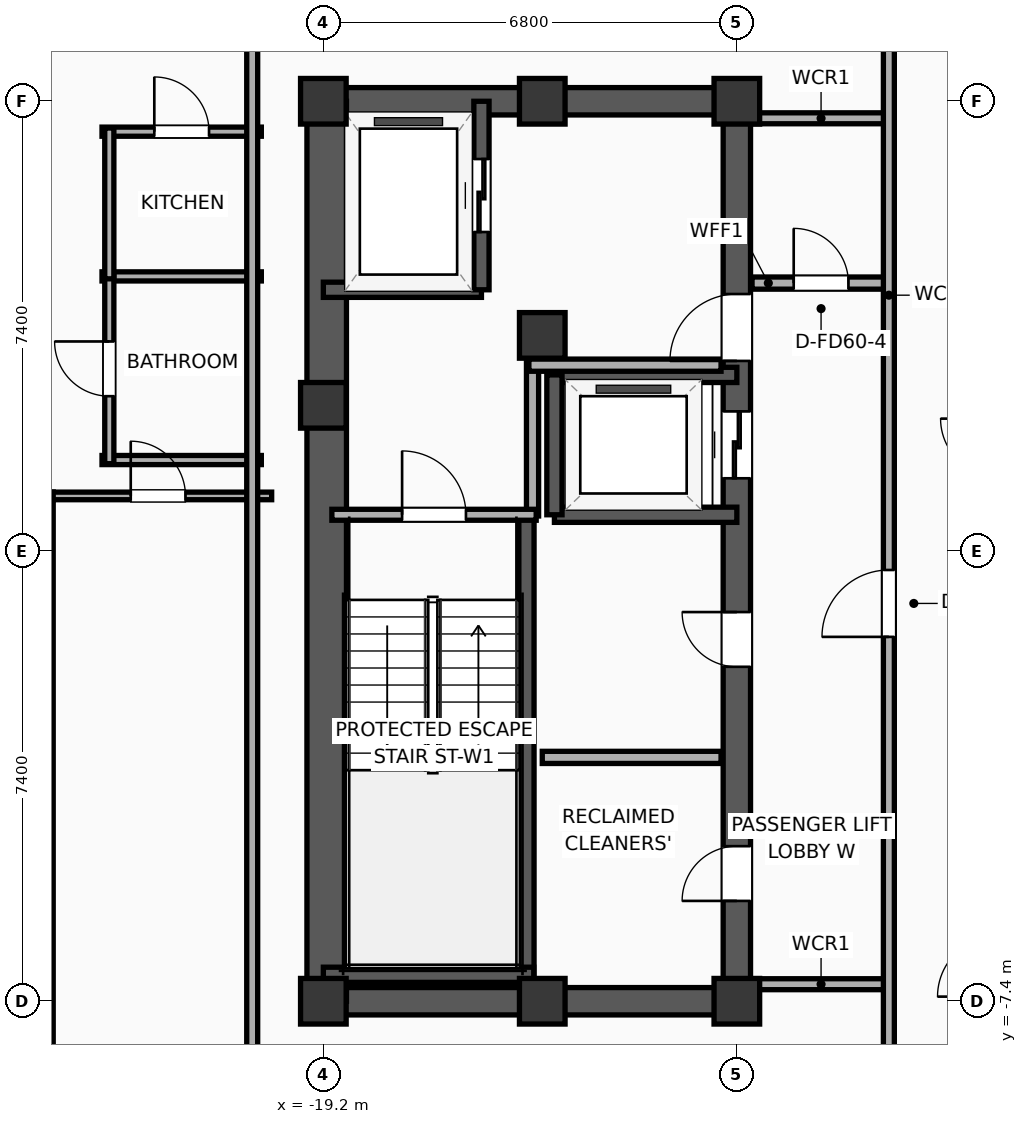
"""IFC4 building model, lengths in metres.
Left out: names, types, materials, properties, quantities, classifications, styles, units other than length and angle.
Written with IfcOpenShell. Run it as: python <this file> out.ifc"""

import sys

from ifc_helpers import new_model, si_unit, direction, frame, frame_2d, origin, origin_2d, place, context, subcontext, project, spatial, rectangle, extrude, element, fill, save


model = new_model("IFC4")
c1 = context("Model", 3, precision=1e-05, world=origin(), true_north=direction((0.0, 1.0)))
c2 = subcontext(c1, "Body", "Model", "MODEL_VIEW")
j1 = project(units=[si_unit("LENGTHUNIT", "METRE"), si_unit("PLANEANGLEUNIT", "RADIAN")], contexts=[c1])
p1 = place(None, origin())
s1 = spatial("IfcSite", under=j1, at=p1, CompositionType="ELEMENT")
p2 = place(p1, origin())
s2 = spatial("IfcBuilding", under=s1, at=p2, CompositionType="ELEMENT")
p3 = place(p2, frame((0.0, 0.0, 271.7)))
s3 = spatial("IfcBuildingStorey", under=s2, at=p3, CompositionType="ELEMENT", Elevation=271.7)
for number, where, z_axis, x_axis in (
    (1, (-19.2, -7.4, 0.0), (0.0, 0.0, 1.0), (1.0, 0.0, 0.0)),
    (2, (-19.2, 2.4, 0.0), (0.0, 0.0, 1.0), (1.0, 0.0, 0.0)),
    (3, (-19.2, 7.4, 0.0), (0.0, 0.0, 1.0), (1.0, 0.0, 0.0)),
    (4, (-15.6, -7.4, 0.0), (0.0, 0.0, 1.0), (1.0, 0.0, 0.0)),
    (5, (-15.6, 7.4, 0.0), (0.0, 0.0, 1.0), (1.0, 0.0, 0.0)),
    (6, (-12.4, -7.4, 0.0), (0.0, 0.0, 1.0), (1.0, 0.0, 0.0)),
    (7, (-15.6, 3.55, 0.0), (0.0, 0.0, 1.0), (1.0, 0.0, 0.0)),
    (8, (-12.4, 7.4, 0.0), (0.0, 0.0, 1.0), (1.0, 0.0, 0.0)),
):
    element("IfcColumn", number, at=place(p3, frame(where, z_axis=z_axis, x_axis=x_axis)), inside=s3, PredefinedType="COLUMN", context=c2, shape_type="SweptSolid", body=[
        extrude(rectangle(XDim=0.75, YDim=0.75, at=origin_2d()), origin(), (0.0, 0.0, 1.0), 3.9),
    ])
for number, where, z_axis, x_axis in (
    (9, (-19.425, -7.4, 0.0), (0.0, 0.0, 1.0), (1.0, 0.0, 0.0)),
    (10, (-19.425, 7.4, 0.0), (0.0, 0.0, 1.0), (1.0, 0.0, 0.0)),
):
    element("IfcWall", number, at=place(p3, frame(where, z_axis=z_axis, x_axis=x_axis)), inside=s3, PredefinedType="SHEAR", context=c2, shape_type="SweptSolid", body=[
        extrude(rectangle(XDim=7.25, YDim=0.45, at=frame_2d((3.625, 0.0))), origin(), (0.0, 0.0, 1.0), 3.65),
    ])
p4 = place(p3, frame((-19.145, -7.4, 0.0), z_axis=(0.0, 0.0, 1.0), x_axis=(0.0, 1.0, 0.0)))
e11 = element("IfcWall", 11, at=p4, inside=s3, PredefinedType="SHEAR", context=c2, shape_type="SweptSolid", body=[
    extrude(rectangle(XDim=14.8, YDim=0.65, at=frame_2d((7.4, 0.0))), origin(), (0.0, 0.0, 1.0), 3.65),
])
p5 = place(p3, frame((-12.4, -7.4, 0.0), z_axis=(0.0, 0.0, 1.0), x_axis=(0.0, 1.0, 0.0)))
e12 = element("IfcWall", 12, at=p5, inside=s3, PredefinedType="SHEAR", context=c2, shape_type="SweptSolid", body=[
    extrude(rectangle(XDim=14.8, YDim=0.45, at=frame_2d((7.4, 0.0))), origin(), (0.0, 0.0, 1.0), 3.65),
])
p6 = place(p5, frame((8.6, 0.0, 0.0)))
e13 = element("IfcOpeningElement", 13, at=p6, cuts=e12, PredefinedType="OPENING", context=c2, shape_type="SweptSolid", body=[
    extrude(rectangle(XDim=1.1, YDim=2.05, at=frame_2d((0.55, 1.025))), frame((0.0, 0.235, 0.0), z_axis=(0.0, -1.0, 0.0), x_axis=(1.0, 0.0, 0.0)), (0.0, 0.0, 1.0), 0.47),
])
p7 = place(p5, frame((10.53, 0.0, 0.0)))
e14 = element("IfcOpeningElement", 14, at=p7, cuts=e12, PredefinedType="OPENING", context=c2, shape_type="SweptSolid", body=[
    extrude(rectangle(XDim=1.1, YDim=2.05, at=frame_2d((0.55, 1.025))), frame((0.0, 0.235, 0.0), z_axis=(0.0, -1.0, 0.0), x_axis=(1.0, 0.0, 0.0)), (0.0, 0.0, 1.0), 0.47),
])
p8 = place(p5, frame((1.65, 0.0, 0.0)))
e15 = element("IfcOpeningElement", 15, at=p8, cuts=e12, PredefinedType="OPENING", context=c2, shape_type="SweptSolid", body=[
    extrude(rectangle(XDim=0.9, YDim=2.05, at=frame_2d((0.45, 1.025))), frame((0.0, 0.235, 0.0), z_axis=(0.0, -1.0, 0.0), x_axis=(1.0, 0.0, 0.0)), (0.0, 0.0, 1.0), 0.47),
])
p9 = place(p5, frame((5.5, 0.0, 0.0)))
e16 = element("IfcOpeningElement", 16, at=p9, cuts=e12, PredefinedType="OPENING", context=c2, shape_type="SweptSolid", body=[
    extrude(rectangle(XDim=0.9, YDim=2.05, at=frame_2d((0.45, 1.025))), frame((0.0, 0.235, 0.0), z_axis=(0.0, -1.0, 0.0), x_axis=(1.0, 0.0, 0.0)), (0.0, 0.0, 1.0), 0.47),
])
p10 = place(p3, frame((-15.86, -7.085, 0.0), z_axis=(0.0, 0.0, 1.0), x_axis=(0.0, 1.0, 0.0)))
e17 = element("IfcWall", 17, at=p10, inside=s3, PredefinedType="SOLIDWALL", context=c2, shape_type="SweptSolid", body=[
    extrude(rectangle(XDim=7.685, YDim=0.25, at=frame_2d((3.843, 0.0))), origin(), (0.0, 0.0, 1.0), 3.65),
])
p11 = place(p3, frame((-19.2, -6.965, 0.0), z_axis=(0.0, 0.0, 1.0), x_axis=(1.0, 0.0, 0.0)))
e18 = element("IfcWall", 18, at=p11, inside=s3, PredefinedType="SOLIDWALL", context=c2, shape_type="SweptSolid", body=[
    extrude(rectangle(XDim=3.46, YDim=0.25, at=frame_2d((1.73, 0.0))), origin(), (0.0, 0.0, 1.0), 3.65),
])
p12 = place(p3, frame((-19.2, 4.3, 0.0), z_axis=(0.0, 0.0, 1.0), x_axis=(1.0, 0.0, 0.0)))
e19 = element("IfcWall", 19, at=p12, inside=s3, PredefinedType="SOLIDWALL", context=c2, shape_type="SweptSolid", body=[
    extrude(rectangle(XDim=2.6, YDim=0.25, at=frame_2d((1.3, 0.0))), origin(), (0.0, 0.0, 1.0), 3.65),
])
p13 = place(p3, frame((-16.6, 4.3, 0.0), z_axis=(0.0, 0.0, 1.0), x_axis=(0.0, 1.0, 0.0)))
e20 = element("IfcWall", 20, at=p13, inside=s3, PredefinedType="SOLIDWALL", context=c2, shape_type="SweptSolid", body=[
    extrude(rectangle(XDim=3.1, YDim=0.25, at=frame_2d((1.55, 0.0))), origin(), (0.0, 0.0, 1.0), 3.65),
])
p14 = place(p13, frame((0.95, 0.0, 0.0)))
e21 = element("IfcOpeningElement", 21, at=p14, cuts=e20, PredefinedType="OPENING", context=c2, shape_type="SweptSolid", body=[
    extrude(rectangle(XDim=1.2, YDim=2.05, at=frame_2d((0.6, 1.025))), frame((0.0, 0.135, 0.0), z_axis=(0.0, -1.0, 0.0), x_axis=(1.0, 0.0, 0.0)), (0.0, 0.0, 1.0), 0.27),
])
for number, where, z_axis, x_axis in (
    (22, (-15.4, 0.6, 0.0), (0.0, 0.0, 1.0), (1.0, 0.0, 0.0)),
    (23, (-12.4, 2.9, 0.0), (0.0, 0.0, 1.0), (-1.0, 0.0, 0.0)),
):
    element("IfcWall", number, at=place(p3, frame(where, z_axis=z_axis, x_axis=x_axis)), inside=s3, PredefinedType="SOLIDWALL", context=c2, shape_type="SweptSolid", body=[
        extrude(rectangle(XDim=3.0, YDim=0.25, at=frame_2d((1.5, 0.0))), origin(), (0.0, 0.0, 1.0), 3.65),
    ])
p15 = place(p3, frame((-15.4, 2.9, 0.0), z_axis=(0.0, 0.0, 1.0), x_axis=(0.0, -1.0, 0.0)))
e24 = element("IfcWall", 24, at=p15, inside=s3, PredefinedType="SOLIDWALL", context=c2, shape_type="SweptSolid", body=[
    extrude(rectangle(XDim=2.3, YDim=0.25, at=frame_2d((1.15, 0.0))), origin(), (0.0, 0.0, 1.0), 3.65),
])
p16 = place(p3, frame((-15.76, 0.58, 0.0), z_axis=(0.0, 0.0, 1.0), x_axis=(0.0, 1.0, 0.0)))
e25 = element("IfcWall", 25, at=p16, inside=s3, PredefinedType="PARTITIONING", context=c2, shape_type="SweptSolid", body=[
    extrude(rectangle(XDim=2.52, YDim=0.2, at=frame_2d((1.26, 0.0))), origin(), (0.0, 0.0, 1.0), 3.65),
])
p17 = place(p3, frame((-15.82, 3.06, 0.0), z_axis=(0.0, 0.0, 1.0), x_axis=(1.0, 0.0, 0.0)))
e26 = element("IfcWall", 26, at=p17, inside=s3, PredefinedType="PARTITIONING", context=c2, shape_type="SweptSolid", body=[
    extrude(rectangle(XDim=3.16, YDim=0.2, at=frame_2d((1.58, 0.0))), origin(), (0.0, 0.0, 1.0), 3.65),
])
p18 = place(p3, frame((-19.06, 0.6, 0.0), z_axis=(0.0, 0.0, 1.0), x_axis=(1.0, 0.0, 0.0)))
e27 = element("IfcWall", 27, at=p18, inside=s3, PredefinedType="PARTITIONING", context=c2, shape_type="SweptSolid", body=[
    extrude(rectangle(XDim=3.36, YDim=0.18, at=frame_2d((1.68, 0.0))), origin(), (0.0, 0.0, 1.0), 3.65),
])
p19 = place(p18, frame((1.155, 0.0, 0.0)))
e28 = element("IfcOpeningElement", 28, at=p19, cuts=e27, PredefinedType="OPENING", context=c2, shape_type="SweptSolid", body=[
    extrude(rectangle(XDim=1.05, YDim=2.05, at=frame_2d((0.525, 1.025))), frame((0.0, 0.1, 0.0), z_axis=(0.0, -1.0, 0.0), x_axis=(1.0, 0.0, 0.0)), (0.0, 0.0, 1.0), 0.2),
])
p20 = place(p3, frame((-15.6, -3.39, 0.0), z_axis=(0.0, 0.0, 1.0), x_axis=(1.0, 0.0, 0.0)))
e29 = element("IfcWall", 29, at=p20, inside=s3, PredefinedType="PARTITIONING", context=c2, shape_type="SweptSolid", body=[
    extrude(rectangle(XDim=2.94, YDim=0.2, at=frame_2d((1.47, 0.0))), origin(), (0.0, 0.0, 1.0), 3.65),
])
p21 = place(p3, frame((-12.15, 4.41, 0.0), z_axis=(0.0, 0.0, 1.0), x_axis=(1.0, 0.0, 0.0)))
e30 = element("IfcWall", 30, at=p21, inside=s3, PredefinedType="PARTITIONING", context=c2, shape_type="SweptSolid", body=[
    extrude(rectangle(XDim=2.27, YDim=0.2, at=frame_2d((1.135, 0.0))), origin(), (0.0, 0.0, 1.0), 3.65),
])
p22 = place(p21, frame((0.685, 0.0, 0.0)))
e31 = element("IfcOpeningElement", 31, at=p22, cuts=e30, PredefinedType="OPENING", context=c2, shape_type="SweptSolid", body=[
    extrude(rectangle(XDim=0.9, YDim=2.05, at=frame_2d((0.45, 1.025))), frame((0.0, 0.11, 0.0), z_axis=(0.0, -1.0, 0.0), x_axis=(1.0, 0.0, 0.0)), (0.0, 0.0, 1.0), 0.22),
])
for number, where, z_axis, x_axis in (
    (32, (-12.15, 7.12, 0.0), (0.0, 0.0, 1.0), (1.0, 0.0, 0.0)),
    (33, (-12.15, -7.12, 0.0), (0.0, 0.0, 1.0), (1.0, 0.0, 0.0)),
):
    element("IfcWall", number, at=place(p3, frame(where, z_axis=z_axis, x_axis=x_axis)), inside=s3, PredefinedType="PARTITIONING", context=c2, shape_type="SweptSolid", body=[
        extrude(rectangle(XDim=2.27, YDim=0.18, at=frame_2d((1.135, 0.0))), origin(), (0.0, 0.0, 1.0), 3.65),
    ])
p23 = place(p3, frame((-9.9, -8.58, 0.0), z_axis=(0.0, 0.0, 1.0), x_axis=(0.0, 1.0, 0.0)))
e34 = element("IfcWall", 34, at=p23, inside=s3, PredefinedType="PARTITIONING", context=c2, shape_type="SweptSolid", body=[
    extrude(rectangle(XDim=17.16, YDim=0.18, at=frame_2d((8.58, 0.0))), origin(), (0.0, 0.0, 1.0), 3.65),
])
p24 = place(p23, frame((7.172, 0.0, 0.0)))
e35 = element("IfcOpeningElement", 35, at=p24, cuts=e34, PredefinedType="OPENING", context=c2, shape_type="SweptSolid", body=[
    extrude(rectangle(XDim=1.1, YDim=2.05, at=frame_2d((0.55, 1.025))), frame((0.0, 0.1, 0.0), z_axis=(0.0, -1.0, 0.0), x_axis=(1.0, 0.0, 0.0)), (0.0, 0.0, 1.0), 0.2),
])
p25 = place(p3, frame((-22.84, 6.9, 0.0), z_axis=(0.0, 0.0, 1.0), x_axis=(1.0, 0.0, 0.0)))
e36 = element("IfcWall", 36, at=p25, inside=s3, PredefinedType="PLUMBINGWALL", context=c2, shape_type="SweptSolid", body=[
    extrude(rectangle(XDim=2.62, YDim=0.15, at=frame_2d((1.31, 0.0))), origin(), (0.0, 0.0, 1.0), 3.65),
])
p26 = place(p25, frame((0.86, 0.0, 0.0)))
e37 = element("IfcOpeningElement", 37, at=p26, cuts=e36, PredefinedType="OPENING", context=c2, shape_type="SweptSolid", body=[
    extrude(rectangle(XDim=0.9, YDim=2.05, at=frame_2d((0.45, 1.025))), frame((0.0, 0.085, 0.0), z_axis=(0.0, -1.0, 0.0), x_axis=(1.0, 0.0, 0.0)), (0.0, 0.0, 1.0), 0.17),
])
for number, where, z_axis, x_axis in (
    (38, (-22.84, 4.52, 0.0), (0.0, 0.0, 1.0), (1.0, 0.0, 0.0)),
    (39, (-22.84, 1.5, 0.0), (0.0, 0.0, 1.0), (1.0, 0.0, 0.0)),
):
    element("IfcWall", number, at=place(p3, frame(where, z_axis=z_axis, x_axis=x_axis)), inside=s3, PredefinedType="PLUMBINGWALL", context=c2, shape_type="SweptSolid", body=[
        extrude(rectangle(XDim=2.62, YDim=0.15, at=frame_2d((1.31, 0.0))), origin(), (0.0, 0.0, 1.0), 3.65),
    ])
p27 = place(p3, frame((-22.72, 1.44, 0.0), z_axis=(0.0, 0.0, 1.0), x_axis=(0.0, 1.0, 0.0)))
e40 = element("IfcWall", 40, at=p27, inside=s3, PredefinedType="PLUMBINGWALL", context=c2, shape_type="SweptSolid", body=[
    extrude(rectangle(XDim=3.12, YDim=0.15, at=frame_2d((1.56, 0.0))), origin(), (0.0, 0.0, 1.0), 3.65),
])
p28 = place(p27, frame((1.11, 0.0, 0.0)))
e41 = element("IfcOpeningElement", 41, at=p28, cuts=e40, PredefinedType="OPENING", context=c2, shape_type="SweptSolid", body=[
    extrude(rectangle(XDim=0.9, YDim=2.05, at=frame_2d((0.45, 1.025))), frame((0.0, 0.085, 0.0), z_axis=(0.0, -1.0, 0.0), x_axis=(1.0, 0.0, 0.0)), (0.0, 0.0, 1.0), 0.17),
])
p29 = place(p3, frame((-22.72, 4.48, 0.0), z_axis=(0.0, 0.0, 1.0), x_axis=(0.0, 1.0, 0.0)))
e42 = element("IfcWall", 42, at=p29, inside=s3, PredefinedType="PLUMBINGWALL", context=c2, shape_type="SweptSolid", body=[
    extrude(rectangle(XDim=2.48, YDim=0.15, at=frame_2d((1.24, 0.0))), origin(), (0.0, 0.0, 1.0), 3.65),
])
p30 = place(p3, frame((-27.104, 0.91, 0.0), z_axis=(0.0, 0.0, 1.0), x_axis=(1.0, 0.0, 0.0)))
e43 = element("IfcWall", 43, at=p30, inside=s3, PredefinedType="PARTITIONING", context=c2, shape_type="SweptSolid", body=[
    extrude(rectangle(XDim=3.461, YDim=0.125, at=frame_2d((1.73, 0.0))), origin(), (0.0, 0.0, 1.0), 3.65),
])
p31 = place(p30, frame((1.281, 0.0, 0.0)))
e44 = element("IfcOpeningElement", 44, at=p31, cuts=e43, PredefinedType="OPENING", context=c2, shape_type="SweptSolid", body=[
    extrude(rectangle(XDim=0.9, YDim=2.05, at=frame_2d((0.45, 1.025))), frame((0.0, 0.073, 0.0), z_axis=(0.0, -1.0, 0.0), x_axis=(1.0, 0.0, 0.0)), (0.0, 0.0, 1.0), 0.145),
])
p32 = place(p3, frame((-23.768, 0.91, 0.0), z_axis=(0.0, 0.0, 1.0), x_axis=(1.0, 0.0, 0.0)))
e45 = element("IfcWall", 45, at=p32, inside=s3, PredefinedType="PARTITIONING", context=c2, shape_type="SweptSolid", body=[
    extrude(rectangle(XDim=3.718, YDim=0.125, at=frame_2d((1.859, 0.0))), origin(), (0.0, 0.0, 1.0), 3.65),
])
p33 = place(p32, frame((1.4, 0.0, 0.0)))
e46 = element("IfcOpeningElement", 46, at=p33, cuts=e45, PredefinedType="OPENING", context=c2, shape_type="SweptSolid", body=[
    extrude(rectangle(XDim=0.9, YDim=2.05, at=frame_2d((0.45, 1.025))), frame((0.0, 0.073, 0.0), z_axis=(0.0, -1.0, 0.0), x_axis=(1.0, 0.0, 0.0)), (0.0, 0.0, 1.0), 0.145),
])
p34 = place(p3, frame((-23.705, -8.81, 0.0), z_axis=(0.0, 0.0, 1.0), x_axis=(0.0, 1.0, 0.0)))
e47 = element("IfcWall", 47, at=p34, inside=s3, PredefinedType="PARTITIONING", context=c2, shape_type="SweptSolid", body=[
    extrude(rectangle(XDim=9.78, YDim=0.125, at=frame_2d((4.89, 0.0))), origin(), (0.0, 0.0, 1.0), 3.65),
])
p35 = place(p3, frame((-20.37, -8.61, 0.0), z_axis=(0.0, 0.0, 1.0), x_axis=(0.0, 1.0, 0.0)))
e48 = element("IfcWall", 48, at=p35, inside=s3, PredefinedType="PARTITIONING", context=c2, shape_type="SweptSolid", body=[
    extrude(rectangle(XDim=17.22, YDim=0.18, at=frame_2d((8.61, 0.0))), origin(), (0.0, 0.0, 1.0), 3.65),
])
p36 = place(p14, origin())
e49 = element("IfcDoor", 49, at=p36, inside=s3, OperationType="SLIDING_TO_LEFT", PredefinedType="DOOR", context=c2, shape_type="SweptSolid", body=[
    extrude(rectangle(XDim=1.2, YDim=2.05, at=frame_2d((0.6, 1.025))), frame((0.0, 0.025, 0.0), z_axis=(0.0, -1.0, 0.0), x_axis=(1.0, 0.0, 0.0)), (0.0, 0.0, 1.0), 0.05),
])
fill(e21, e49)
p37 = place(p6, origin())
e50 = element("IfcDoor", 50, at=p37, inside=s3, OperationType="SLIDING_TO_LEFT", PredefinedType="DOOR", context=c2, shape_type="SweptSolid", body=[
    extrude(rectangle(XDim=1.1, YDim=2.05, at=frame_2d((0.55, 1.025))), frame((0.0, 0.025, 0.0), z_axis=(0.0, -1.0, 0.0), x_axis=(1.0, 0.0, 0.0)), (0.0, 0.0, 1.0), 0.05),
])
fill(e13, e50)
p38 = place(p19, origin())
e51 = element("IfcDoor", 51, at=p38, inside=s3, OperationType="SINGLE_SWING_LEFT", PredefinedType="DOOR", context=c2, shape_type="SweptSolid", body=[
    extrude(rectangle(XDim=1.05, YDim=2.05, at=frame_2d((0.525, 1.025))), frame((0.0, 0.025, 0.0), z_axis=(0.0, -1.0, 0.0), x_axis=(1.0, 0.0, 0.0)), (0.0, 0.0, 1.0), 0.05),
])
fill(e28, e51)
p39 = place(p22, origin())
e52 = element("IfcDoor", 52, at=p39, inside=s3, OperationType="SINGLE_SWING_LEFT", PredefinedType="DOOR", context=c2, shape_type="SweptSolid", body=[
    extrude(rectangle(XDim=0.9, YDim=2.05, at=frame_2d((0.45, 1.025))), frame((0.0, 0.025, 0.0), z_axis=(0.0, -1.0, 0.0), x_axis=(1.0, 0.0, 0.0)), (0.0, 0.0, 1.0), 0.05),
])
fill(e31, e52)
p40 = place(p24, origin())
e53 = element("IfcDoor", 53, at=p40, inside=s3, OperationType="SINGLE_SWING_LEFT", PredefinedType="DOOR", context=c2, shape_type="SweptSolid", body=[
    extrude(rectangle(XDim=1.1, YDim=2.05, at=frame_2d((0.55, 1.025))), frame((0.0, 0.025, 0.0), z_axis=(0.0, -1.0, 0.0), x_axis=(1.0, 0.0, 0.0)), (0.0, 0.0, 1.0), 0.05),
])
fill(e35, e53)
p41 = place(p26, origin())
e54 = element("IfcDoor", 54, at=p41, inside=s3, OperationType="SINGLE_SWING_LEFT", PredefinedType="DOOR", context=c2, shape_type="SweptSolid", body=[
    extrude(rectangle(XDim=0.9, YDim=2.05, at=frame_2d((0.45, 1.025))), frame((0.0, 0.025, 0.0), z_axis=(0.0, -1.0, 0.0), x_axis=(1.0, 0.0, 0.0)), (0.0, 0.0, 1.0), 0.05),
])
fill(e37, e54)
p42 = place(p28, origin())
e55 = element("IfcDoor", 55, at=p42, inside=s3, OperationType="SINGLE_SWING_RIGHT", PredefinedType="DOOR", context=c2, shape_type="SweptSolid", body=[
    extrude(rectangle(XDim=0.9, YDim=2.05, at=frame_2d((0.45, 1.025))), frame((0.0, 0.025, 0.0), z_axis=(0.0, -1.0, 0.0), x_axis=(1.0, 0.0, 0.0)), (0.0, 0.0, 1.0), 0.05),
])
fill(e41, e55)
p43 = place(p33, origin())
e56 = element("IfcDoor", 56, at=p43, inside=s3, OperationType="SINGLE_SWING_LEFT", PredefinedType="DOOR", context=c2, shape_type="SweptSolid", body=[
    extrude(rectangle(XDim=0.9, YDim=2.05, at=frame_2d((0.45, 1.025))), frame((0.0, 0.025, 0.0), z_axis=(0.0, -1.0, 0.0), x_axis=(1.0, 0.0, 0.0)), (0.0, 0.0, 1.0), 0.05),
])
fill(e46, e56)
p44 = place(p7, origin())
e57 = element("IfcDoor", 57, at=p44, inside=s3, OperationType="SINGLE_SWING_LEFT", PredefinedType="DOOR", context=c2, shape_type="SweptSolid", body=[
    extrude(rectangle(XDim=1.1, YDim=2.05, at=frame_2d((0.55, 1.025))), frame((0.0, 0.025, 0.0), z_axis=(0.0, -1.0, 0.0), x_axis=(1.0, 0.0, 0.0)), (0.0, 0.0, 1.0), 0.05),
])
fill(e14, e57)
p45 = place(p8, origin())
e58 = element("IfcDoor", 58, at=p45, inside=s3, OperationType="SINGLE_SWING_LEFT", PredefinedType="DOOR", context=c2, shape_type="SweptSolid", body=[
    extrude(rectangle(XDim=0.9, YDim=2.05, at=frame_2d((0.45, 1.025))), frame((0.0, 0.025, 0.0), z_axis=(0.0, -1.0, 0.0), x_axis=(1.0, 0.0, 0.0)), (0.0, 0.0, 1.0), 0.05),
])
fill(e15, e58)
p46 = place(p9, origin())
e59 = element("IfcDoor", 59, at=p46, inside=s3, OperationType="SINGLE_SWING_RIGHT", PredefinedType="DOOR", context=c2, shape_type="SweptSolid", body=[
    extrude(rectangle(XDim=0.9, YDim=2.05, at=frame_2d((0.45, 1.025))), frame((0.0, 0.025, 0.0), z_axis=(0.0, -1.0, 0.0), x_axis=(1.0, 0.0, 0.0)), (0.0, 0.0, 1.0), 0.05),
])
fill(e16, e59)
save(model, sys.argv[1])
